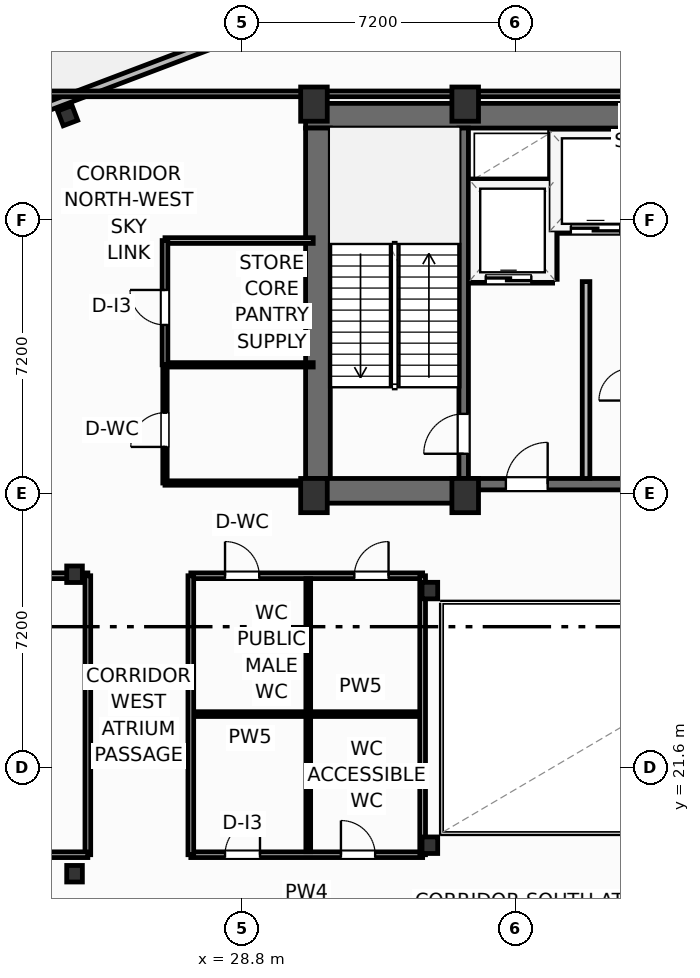
"""IFC4 building model, lengths in metres.
Left out: names, types, materials, properties, quantities, classifications, styles, units other than length and angle.
Written with IfcOpenShell. Run it as: python <this file> out.ifc"""

import sys

from ifc_helpers import new_model, si_unit, direction, frame, frame_2d, origin, origin_2d, place, context, subcontext, project, spatial, rectangle, i_section, extrude, element, fill, save


model = new_model("IFC4")
c1 = context("Model", 3, precision=1e-05, world=origin(), true_north=direction((0.0, 1.0)))
c2 = subcontext(c1, "Body", "Model", "MODEL_VIEW")
j1 = project(units=[si_unit("LENGTHUNIT", "METRE"), si_unit("PLANEANGLEUNIT", "RADIAN")], contexts=[c1])
p1 = place(None, origin())
s1 = spatial("IfcSite", under=j1, at=p1, CompositionType="ELEMENT")
p2 = place(p1, origin())
s2 = spatial("IfcBuilding", under=s1, at=p2, CompositionType="ELEMENT")
p3 = place(p2, frame((0.0, 0.0, 207.9)))
s3 = spatial("IfcBuildingStorey", under=s2, at=p3, CompositionType="ELEMENT", Elevation=207.9)
for number, where, z_axis, x_axis in (
    (1, (30.7, 28.75, 0.0), (0.0, 0.0, 1.0), (1.0, 0.0, 0.0)),
    (2, (34.68, 28.75, 0.0), (0.0, 0.0, 1.0), (1.0, 0.0, 0.0)),
    (3, (30.7, 39.05, 0.0), (0.0, 0.0, 1.0), (1.0, 0.0, 0.0)),
    (4, (34.68, 39.05, 0.0), (0.0, 0.0, 1.0), (1.0, 0.0, 0.0)),
):
    element("IfcColumn", number, at=place(p3, frame(where, z_axis=z_axis, x_axis=x_axis)), inside=s3, PredefinedType="COLUMN", context=c2, shape_type="SweptSolid", body=[
        extrude(rectangle(XDim=0.7, YDim=0.9, at=origin_2d()), origin(), (0.0, 0.0, 1.0), 4.8),
    ])
for number, where, z_axis, x_axis in (
    (5, (33.75, 19.55, 0.0), (0.0, 0.0, 1.0), (1.0, 0.0, 0.0)),
    (6, (33.75, 26.25, 0.0), (0.0, 0.0, 1.0), (1.0, 0.0, 0.0)),
    (7, (24.4, 18.8, 0.0), (0.0, 0.0, 1.0), (1.0, 0.0, 0.0)),
    (8, (24.4, 26.68, 0.0), (0.0, 0.0, 1.0), (1.0, 0.0, 0.0)),
):
    element("IfcColumn", number, at=place(p3, frame(where, z_axis=z_axis, x_axis=x_axis)), inside=s3, PredefinedType="COLUMN", context=c2, shape_type="SweptSolid", body=[
        extrude(i_section(OverallWidth=0.412, OverallDepth=0.435, WebThickness=0.036, FlangeThickness=0.057, FilletRadius=0.025, at=origin_2d()), origin(), (0.0, 0.0, 1.0), 4.8),
    ])
p4 = place(p3, frame((30.48, 38.745, 0.0), z_axis=(0.0, 0.0, 1.0), x_axis=(1.0, 0.0, 0.0)))
e9 = element("IfcWall", 9, at=p4, inside=s3, PredefinedType="SHEAR", context=c2, shape_type="SweptSolid", body=[
    extrude(rectangle(XDim=17.44, YDim=0.65, at=frame_2d((8.72, 0.0))), origin(), (0.0, 0.0, 1.0), 4.55),
])
p5 = place(p3, frame((30.805, 29.2, 0.0), z_axis=(0.0, 0.0, 1.0), x_axis=(0.0, 1.0, 0.0)))
e10 = element("IfcWall", 10, at=p5, inside=s3, PredefinedType="SHEAR", context=c2, shape_type="SweptSolid", body=[
    extrude(rectangle(XDim=9.22, YDim=0.65, at=frame_2d((4.61, 0.0))), origin(), (0.0, 0.0, 1.0), 4.55),
])
p6 = place(p3, frame((30.48, 28.875, 0.0), z_axis=(0.0, 0.0, 1.0), x_axis=(1.0, 0.0, 0.0)))
e11 = element("IfcWall", 11, at=p6, inside=s3, PredefinedType="SHEAR", context=c2, shape_type="SweptSolid", body=[
    extrude(rectangle(XDim=4.32, YDim=0.65, at=frame_2d((2.16, 0.0))), origin(), (0.0, 0.0, 1.0), 4.55),
])
p7 = place(p3, frame((34.8, 29.05, 0.0), z_axis=(0.0, 0.0, 1.0), x_axis=(1.0, 0.0, 0.0)))
e12 = element("IfcWall", 12, at=p7, inside=s3, PredefinedType="SHEAR", context=c2, shape_type="SweptSolid", body=[
    extrude(rectangle(XDim=8.8, YDim=0.3, at=frame_2d((4.4, 0.0))), origin(), (0.0, 0.0, 1.0), 4.55),
])
p8 = place(p7, frame((0.95, 0.0, 0.0)))
e13 = element("IfcOpeningElement", 13, at=p8, cuts=e12, PredefinedType="OPENING", context=c2, shape_type="SweptSolid", body=[
    extrude(rectangle(XDim=1.1, YDim=2.15, at=frame_2d((0.55, 1.075))), frame((0.0, 0.16, 0.0), z_axis=(0.0, -1.0, 0.0), x_axis=(1.0, 0.0, 0.0)), (0.0, 0.0, 1.0), 0.32),
])
p9 = place(p7, frame((6.75, 0.0, 0.0)))
e14 = element("IfcOpeningElement", 14, at=p9, cuts=e12, PredefinedType="OPENING", context=c2, shape_type="SweptSolid", body=[
    extrude(rectangle(XDim=1.1, YDim=2.15, at=frame_2d((0.55, 1.075))), frame((0.0, 0.16, 0.0), z_axis=(0.0, -1.0, 0.0), x_axis=(1.0, 0.0, 0.0)), (0.0, 0.0, 1.0), 0.32),
])
p10 = place(p7, frame((4.45, 0.0, 0.0)))
e15 = element("IfcOpeningElement", 15, at=p10, cuts=e12, PredefinedType="OPENING", context=c2, shape_type="SweptSolid", body=[
    extrude(rectangle(XDim=0.95, YDim=2.15, at=frame_2d((0.475, 1.075))), frame((0.0, 0.16, 0.0), z_axis=(0.0, -1.0, 0.0), x_axis=(1.0, 0.0, 0.0)), (0.0, 0.0, 1.0), 0.32),
])
p11 = place(p3, frame((34.64, 29.2, 0.0), z_axis=(0.0, 0.0, 1.0), x_axis=(0.0, 1.0, 0.0)))
e16 = element("IfcWall", 16, at=p11, inside=s3, PredefinedType="SHEAR", context=c2, shape_type="SweptSolid", body=[
    extrude(rectangle(XDim=9.22, YDim=0.25, at=frame_2d((4.61, 0.0))), origin(), (0.0, 0.0, 1.0), 4.55),
])
p12 = place(p11, frame((0.65, 0.0, 0.0)))
e17 = element("IfcOpeningElement", 17, at=p12, cuts=e16, PredefinedType="OPENING", context=c2, shape_type="SweptSolid", body=[
    extrude(rectangle(XDim=1.05, YDim=2.15, at=frame_2d((0.525, 1.075))), frame((0.0, 0.135, 0.0), z_axis=(0.0, -1.0, 0.0), x_axis=(1.0, 0.0, 0.0)), (0.0, 0.0, 1.0), 0.27),
])
p13 = place(p3, frame((24.219, 38.747, -0.32), z_axis=(0.0, 0.0, 1.0), x_axis=(0.935221751401, 0.354062530786, 0.0)))
e18 = element("IfcColumn", 18, at=p13, inside=s3, PredefinedType="COLUMN", context=c2, shape_type="SweptSolid", body=[
    extrude(i_section(OverallWidth=0.406, OverallDepth=0.416, WebThickness=0.03, FlangeThickness=0.048, FilletRadius=0.025, at=origin_2d()), origin(), (0.0, 0.0, 1.0), 5.12),
])
p14 = place(p3, frame((8.315, 33.164, 0.0), z_axis=(0.0, 0.0, 1.0), x_axis=(0.935222646765, 0.354060165759, 0.0)))
e19 = element("IfcWall", 19, at=p14, inside=s3, PredefinedType="SOLIDWALL", context=c2, shape_type="SweptSolid", body=[
    extrude(rectangle(XDim=52.2, YDim=0.22, at=frame_2d((26.1, 0.0))), origin(), (0.0, 0.0, 1.0), 3.83),
])
p15 = place(p14, frame((23.64, 0.0, 0.0)))
e20 = element("IfcOpeningElement", 20, at=p15, cuts=e19, PredefinedType="OPENING", context=c2, shape_type="SweptSolid", body=[
    extrude(rectangle(XDim=1.85, YDim=2.3, at=frame_2d((0.925, 1.15))), frame((0.0, 0.12, 0.0), z_axis=(0.0, -1.0, 0.0), x_axis=(1.0, 0.0, 0.0)), (0.0, 0.0, 1.0), 0.24),
])
p16 = place(p14, frame((0.55, 0.0, 0.75)))
e21 = element("IfcOpeningElement", 21, at=p16, cuts=e19, PredefinedType="OPENING", context=c2, shape_type="SweptSolid", body=[
    extrude(rectangle(XDim=1.85, YDim=1.75, at=frame_2d((0.925, 0.875))), frame((0.0, 0.12, 0.0), z_axis=(0.0, -1.0, 0.0), x_axis=(1.0, 0.0, 0.0)), (0.0, 0.0, 1.0), 0.24),
])
p17 = place(p14, frame((49.8, 0.0, 0.75)))
e22 = element("IfcOpeningElement", 22, at=p17, cuts=e19, PredefinedType="OPENING", context=c2, shape_type="SweptSolid", body=[
    extrude(rectangle(XDim=1.85, YDim=1.75, at=frame_2d((0.925, 0.875))), frame((0.0, 0.12, 0.0), z_axis=(0.0, -1.0, 0.0), x_axis=(1.0, 0.0, 0.0)), (0.0, 0.0, 1.0), 0.24),
])
p18 = place(p3, frame((27.46, 26.64, 0.0), z_axis=(0.0, 0.0, 1.0), x_axis=(1.0, 0.0, 0.0)))
e23 = element("IfcWall", 23, at=p18, inside=s3, PredefinedType="PARTITIONING", context=c2, shape_type="SweptSolid", body=[
    extrude(rectangle(XDim=6.1, YDim=0.15, at=frame_2d((3.05, 0.0))), origin(), (0.0, 0.0, 1.0), 3.762),
])
p19 = place(p18, frame((0.9, 0.0, 0.0)))
e24 = element("IfcOpeningElement", 24, at=p19, cuts=e23, PredefinedType="OPENING", context=c2, shape_type="SweptSolid", body=[
    extrude(rectangle(XDim=0.9, YDim=2.05, at=frame_2d((0.45, 1.025))), frame((0.0, 0.085, 0.0), z_axis=(0.0, -1.0, 0.0), x_axis=(1.0, 0.0, 0.0)), (0.0, 0.0, 1.0), 0.17),
])
p20 = place(p18, frame((4.303, 0.0, 0.0)))
e25 = element("IfcOpeningElement", 25, at=p20, cuts=e23, PredefinedType="OPENING", context=c2, shape_type="SweptSolid", body=[
    extrude(rectangle(XDim=0.9, YDim=2.05, at=frame_2d((0.45, 1.025))), frame((0.0, 0.085, 0.0), z_axis=(0.0, -1.0, 0.0), x_axis=(1.0, 0.0, 0.0)), (0.0, 0.0, 1.0), 0.17),
])
p21 = place(p3, frame((27.46, 19.3, 0.0), z_axis=(0.0, 0.0, 1.0), x_axis=(1.0, 0.0, 0.0)))
e26 = element("IfcWall", 26, at=p21, inside=s3, PredefinedType="PARTITIONING", context=c2, shape_type="SweptSolid", body=[
    extrude(rectangle(XDim=6.1, YDim=0.15, at=frame_2d((3.05, 0.0))), origin(), (0.0, 0.0, 1.0), 3.762),
])
p22 = place(p21, frame((0.9, 0.0, 0.0)))
e27 = element("IfcOpeningElement", 27, at=p22, cuts=e26, PredefinedType="OPENING", context=c2, shape_type="SweptSolid", body=[
    extrude(rectangle(XDim=0.92, YDim=2.05, at=frame_2d((0.46, 1.025))), frame((0.0, 0.085, 0.0), z_axis=(0.0, -1.0, 0.0), x_axis=(1.0, 0.0, 0.0)), (0.0, 0.0, 1.0), 0.17),
])
p23 = place(p21, frame((3.95, 0.0, 0.0)))
e28 = element("IfcOpeningElement", 28, at=p23, cuts=e26, PredefinedType="OPENING", context=c2, shape_type="SweptSolid", body=[
    extrude(rectangle(XDim=0.9, YDim=2.05, at=frame_2d((0.45, 1.025))), frame((0.0, 0.085, 0.0), z_axis=(0.0, -1.0, 0.0), x_axis=(1.0, 0.0, 0.0)), (0.0, 0.0, 1.0), 0.17),
])
p24 = place(p3, frame((30.55, 19.38, 0.0), z_axis=(0.0, 0.0, 1.0), x_axis=(0.0, 1.0, 0.0)))
e29 = element("IfcWall", 29, at=p24, inside=s3, PredefinedType="PARTITIONING", context=c2, shape_type="SweptSolid", body=[
    extrude(rectangle(XDim=7.18, YDim=0.125, at=frame_2d((3.59, 0.0))), origin(), (0.0, 0.0, 1.0), 4.55),
])
p25 = place(p3, frame((27.52, 23.0, 0.0), z_axis=(0.0, 0.0, 1.0), x_axis=(1.0, 0.0, 0.0)))
e30 = element("IfcWall", 30, at=p25, inside=s3, PredefinedType="PARTITIONING", context=c2, shape_type="SweptSolid", body=[
    extrude(rectangle(XDim=6.0, YDim=0.125, at=frame_2d((3.0, 0.0))), origin(), (0.0, 0.0, 1.0), 4.55),
])
p26 = place(p3, frame((27.46, 19.3, 0.0), z_axis=(0.0, 0.0, 1.0), x_axis=(0.0, 1.0, 0.0)))
e31 = element("IfcWall", 31, at=p26, inside=s3, PredefinedType="PARTITIONING", context=c2, shape_type="SweptSolid", body=[
    extrude(rectangle(XDim=7.34, YDim=0.15, at=frame_2d((3.67, 0.0))), origin(), (0.0, 0.0, 1.0), 4.55),
])
p27 = place(p3, frame((33.56, 19.3, 0.0), z_axis=(0.0, 0.0, 1.0), x_axis=(0.0, 1.0, 0.0)))
e32 = element("IfcWall", 32, at=p27, inside=s3, PredefinedType="PARTITIONING", context=c2, shape_type="SweptSolid", body=[
    extrude(rectangle(XDim=7.34, YDim=0.15, at=frame_2d((3.67, 0.0))), origin(), (0.0, 0.0, 1.0), 3.924),
])
p28 = place(p3, frame((15.9, 26.64, 0.0), z_axis=(0.0, 0.0, 1.0), x_axis=(1.0, 0.0, 0.0)))
e33 = element("IfcWall", 33, at=p28, inside=s3, PredefinedType="PARTITIONING", context=c2, shape_type="SweptSolid", body=[
    extrude(rectangle(XDim=8.85, YDim=0.15, at=frame_2d((4.425, 0.0))), origin(), (0.0, 0.0, 1.0), 3.762),
])
p29 = place(p28, frame((2.2, 0.0, 0.0)))
e34 = element("IfcOpeningElement", 34, at=p29, cuts=e33, PredefinedType="OPENING", context=c2, shape_type="SweptSolid", body=[
    extrude(rectangle(XDim=2.0, YDim=2.05, at=frame_2d((1.0, 1.025))), frame((0.0, 0.085, 0.0), z_axis=(0.0, -1.0, 0.0), x_axis=(1.0, 0.0, 0.0)), (0.0, 0.0, 1.0), 0.17),
])
p30 = place(p3, frame((24.75, 19.3, 0.0), z_axis=(0.0, 0.0, 1.0), x_axis=(0.0, 1.0, 0.0)))
e35 = element("IfcWall", 35, at=p30, inside=s3, PredefinedType="PARTITIONING", context=c2, shape_type="SweptSolid", body=[
    extrude(rectangle(XDim=7.34, YDim=0.15, at=frame_2d((3.67, 0.0))), origin(), (0.0, 0.0, 1.0), 4.55),
])
p31 = place(p3, frame((15.9, 19.3, 0.0), z_axis=(0.0, 0.0, 1.0), x_axis=(1.0, 0.0, 0.0)))
e36 = element("IfcWall", 36, at=p31, inside=s3, PredefinedType="PARTITIONING", context=c2, shape_type="SweptSolid", body=[
    extrude(rectangle(XDim=8.85, YDim=0.15, at=frame_2d((4.425, 0.0))), origin(), (0.0, 0.0, 1.0), 4.55),
])
p32 = place(p3, frame((20.0, 39.32, 0.0), z_axis=(0.0, 0.0, 1.0), x_axis=(1.0, 0.0, 0.0)))
e37 = element("IfcWall", 37, at=p32, inside=s3, PredefinedType="PARTITIONING", context=c2, shape_type="SweptSolid", body=[
    extrude(rectangle(XDim=40.0, YDim=0.15, at=frame_2d((20.0, 0.0))), origin(), (0.0, 0.0, 1.0), 4.55),
])
p33 = place(p32, frame((31.2, 0.0, 0.0)))
e38 = element("IfcOpeningElement", 38, at=p33, cuts=e37, PredefinedType="OPENING", context=c2, shape_type="SweptSolid", body=[
    extrude(rectangle(XDim=1.0, YDim=2.05, at=frame_2d((0.5, 1.025))), frame((0.0, 0.085, 0.0), z_axis=(0.0, -1.0, 0.0), x_axis=(1.0, 0.0, 0.0)), (0.0, 0.0, 1.0), 0.17),
])
p34 = place(p3, frame((37.86, 29.2, 0.0), z_axis=(0.0, 0.0, 1.0), x_axis=(0.0, 1.0, 0.0)))
e39 = element("IfcWall", 39, at=p34, inside=s3, PredefinedType="PARTITIONING", context=c2, shape_type="SweptSolid", body=[
    extrude(rectangle(XDim=5.18, YDim=0.2, at=frame_2d((2.59, 0.0))), origin(), (0.0, 0.0, 1.0), 4.55),
])
p35 = place(p3, frame((34.8, 34.44, 0.0), z_axis=(0.0, 0.0, 1.0), x_axis=(1.0, 0.0, 0.0)))
e40 = element("IfcWall", 40, at=p35, inside=s3, PredefinedType="PARTITIONING", context=c2, shape_type="SweptSolid", body=[
    extrude(rectangle(XDim=2.18, YDim=0.2, at=frame_2d((1.09, 0.0))), origin(), (0.0, 0.0, 1.0), 4.55),
])
p36 = place(p35, frame((0.42, 0.0, 0.0)))
e41 = element("IfcOpeningElement", 41, at=p36, cuts=e40, PredefinedType="OPENING", context=c2, shape_type="SweptSolid", body=[
    extrude(rectangle(XDim=1.2, YDim=2.2, at=frame_2d((0.6, 1.1))), frame((0.0, 0.11, 0.0), z_axis=(0.0, -1.0, 0.0), x_axis=(1.0, 0.0, 0.0)), (0.0, 0.0, 1.0), 0.22),
])
p37 = place(p3, frame((34.8, 36.98, 0.0), z_axis=(0.0, 0.0, 1.0), x_axis=(1.0, 0.0, 0.0)))
e42 = element("IfcWall", 42, at=p37, inside=s3, PredefinedType="PARTITIONING", context=c2, shape_type="SweptSolid", body=[
    extrude(rectangle(XDim=2.18, YDim=0.2, at=frame_2d((1.09, 0.0))), origin(), (0.0, 0.0, 1.0), 4.55),
])
p38 = place(p3, frame((37.0, 34.44, 0.0), z_axis=(0.0, 0.0, 1.0), x_axis=(0.0, 1.0, 0.0)))
e43 = element("IfcWall", 43, at=p38, inside=s3, PredefinedType="PARTITIONING", context=c2, shape_type="SweptSolid", body=[
    extrude(rectangle(XDim=3.9, YDim=0.2, at=frame_2d((1.95, 0.0))), origin(), (0.0, 0.0, 1.0), 4.55),
])
p39 = place(p3, frame((37.06, 35.75, 0.0), z_axis=(0.0, 0.0, 1.0), x_axis=(1.0, 0.0, 0.0)))
e44 = element("IfcWall", 44, at=p39, inside=s3, PredefinedType="PARTITIONING", context=c2, shape_type="SweptSolid", body=[
    extrude(rectangle(XDim=2.12, YDim=0.2, at=frame_2d((1.06, 0.0))), origin(), (0.0, 0.0, 1.0), 4.55),
])
p40 = place(p39, frame((0.4, 0.0, 0.0)))
e45 = element("IfcOpeningElement", 45, at=p40, cuts=e44, PredefinedType="OPENING", context=c2, shape_type="SweptSolid", body=[
    extrude(rectangle(XDim=1.3, YDim=2.2, at=frame_2d((0.65, 1.1))), frame((0.0, 0.11, 0.0), z_axis=(0.0, -1.0, 0.0), x_axis=(1.0, 0.0, 0.0)), (0.0, 0.0, 1.0), 0.22),
])
p41 = place(p3, frame((26.8, 32.19, 0.0), z_axis=(0.0, 0.0, 1.0), x_axis=(1.0, 0.0, 0.0)))
e46 = element("IfcWall", 46, at=p41, inside=s3, PredefinedType="PARTITIONING", context=c2, shape_type="SweptSolid", body=[
    extrude(rectangle(XDim=3.88, YDim=0.115, at=frame_2d((1.94, 0.0))), origin(), (0.0, 0.0, 1.0), 4.55),
])
p42 = place(p3, frame((26.78, 29.08, 0.0), z_axis=(0.0, 0.0, 1.0), x_axis=(1.0, 0.0, 0.0)))
e47 = element("IfcWall", 47, at=p42, inside=s3, PredefinedType="PARTITIONING", context=c2, shape_type="SweptSolid", body=[
    extrude(rectangle(XDim=3.7, YDim=0.115, at=frame_2d((1.85, 0.0))), origin(), (0.0, 0.0, 1.0), 4.55),
])
p43 = place(p3, frame((26.78, 35.46, 0.0), z_axis=(0.0, 0.0, 1.0), x_axis=(1.0, 0.0, 0.0)))
e48 = element("IfcWall", 48, at=p43, inside=s3, PredefinedType="PARTITIONING", context=c2, shape_type="SweptSolid", body=[
    extrude(rectangle(XDim=3.9, YDim=0.15, at=frame_2d((1.95, 0.0))), origin(), (0.0, 0.0, 1.0), 4.55),
])
p44 = place(p3, frame((26.78, 29.08, 0.0), z_axis=(0.0, 0.0, 1.0), x_axis=(0.0, 1.0, 0.0)))
e49 = element("IfcWall", 49, at=p44, inside=s3, PredefinedType="PARTITIONING", context=c2, shape_type="SweptSolid", body=[
    extrude(rectangle(XDim=3.11, YDim=0.115, at=frame_2d((1.555, 0.0))), origin(), (0.0, 0.0, 1.0), 4.55),
])
p45 = place(p44, frame((0.95, 0.0, 0.0)))
e50 = element("IfcOpeningElement", 50, at=p45, cuts=e49, PredefinedType="OPENING", context=c2, shape_type="SweptSolid", body=[
    extrude(rectangle(XDim=0.9, YDim=2.05, at=frame_2d((0.45, 1.025))), frame((0.0, 0.067, 0.0), z_axis=(0.0, -1.0, 0.0), x_axis=(1.0, 0.0, 0.0)), (0.0, 0.0, 1.0), 0.135),
])
p46 = place(p3, frame((26.78, 32.19, 0.0), z_axis=(0.0, 0.0, 1.0), x_axis=(0.0, 1.0, 0.0)))
e51 = element("IfcWall", 51, at=p46, inside=s3, PredefinedType="PARTITIONING", context=c2, shape_type="SweptSolid", body=[
    extrude(rectangle(XDim=3.27, YDim=0.15, at=frame_2d((1.635, 0.0))), origin(), (0.0, 0.0, 1.0), 4.55),
])
p47 = place(p46, frame((1.05, 0.0, 0.0)))
e52 = element("IfcOpeningElement", 52, at=p47, cuts=e51, PredefinedType="OPENING", context=c2, shape_type="SweptSolid", body=[
    extrude(rectangle(XDim=0.92, YDim=2.05, at=frame_2d((0.46, 1.025))), frame((0.0, 0.085, 0.0), z_axis=(0.0, -1.0, 0.0), x_axis=(1.0, 0.0, 0.0)), (0.0, 0.0, 1.0), 0.17),
])
p48 = place(p19, origin())
e53 = element("IfcDoor", 53, at=p48, inside=s3, OperationType="SINGLE_SWING_LEFT", PredefinedType="DOOR", context=c2, shape_type="SweptSolid", body=[
    extrude(rectangle(XDim=0.9, YDim=2.05, at=frame_2d((0.45, 1.025))), frame((0.0, 0.025, 0.0), z_axis=(0.0, -1.0, 0.0), x_axis=(1.0, 0.0, 0.0)), (0.0, 0.0, 1.0), 0.05),
])
fill(e24, e53)
p49 = place(p20, origin())
e54 = element("IfcDoor", 54, at=p49, inside=s3, OperationType="SINGLE_SWING_RIGHT", PredefinedType="DOOR", context=c2, shape_type="SweptSolid", body=[
    extrude(rectangle(XDim=0.9, YDim=2.05, at=frame_2d((0.45, 1.025))), frame((0.0, 0.025, 0.0), z_axis=(0.0, -1.0, 0.0), x_axis=(1.0, 0.0, 0.0)), (0.0, 0.0, 1.0), 0.05),
])
fill(e25, e54)
p50 = place(p22, origin())
e55 = element("IfcDoor", 55, at=p50, inside=s3, OperationType="SINGLE_SWING_RIGHT", PredefinedType="DOOR", context=c2, shape_type="SweptSolid", body=[
    extrude(rectangle(XDim=0.92, YDim=2.05, at=frame_2d((0.46, 1.025))), frame((0.0, 0.025, 0.0), z_axis=(0.0, -1.0, 0.0), x_axis=(1.0, 0.0, 0.0)), (0.0, 0.0, 1.0), 0.05),
])
fill(e27, e55)
p51 = place(p23, origin())
e56 = element("IfcDoor", 56, at=p51, inside=s3, OperationType="SINGLE_SWING_LEFT", PredefinedType="DOOR", context=c2, shape_type="SweptSolid", body=[
    extrude(rectangle(XDim=0.9, YDim=2.05, at=frame_2d((0.45, 1.025))), frame((0.0, 0.025, 0.0), z_axis=(0.0, -1.0, 0.0), x_axis=(1.0, 0.0, 0.0)), (0.0, 0.0, 1.0), 0.05),
])
fill(e28, e56)
p52 = place(p12, origin())
e57 = element("IfcDoor", 57, at=p52, inside=s3, OperationType="SINGLE_SWING_LEFT", PredefinedType="DOOR", context=c2, shape_type="SweptSolid", body=[
    extrude(rectangle(XDim=1.05, YDim=2.15, at=frame_2d((0.525, 1.075))), frame((0.0, 0.025, 0.0), z_axis=(0.0, -1.0, 0.0), x_axis=(1.0, 0.0, 0.0)), (0.0, 0.0, 1.0), 0.05),
])
fill(e17, e57)
p53 = place(p8, origin())
e58 = element("IfcDoor", 58, at=p53, inside=s3, OperationType="SINGLE_SWING_RIGHT", PredefinedType="DOOR", context=c2, shape_type="SweptSolid", body=[
    extrude(rectangle(XDim=1.1, YDim=2.15, at=frame_2d((0.55, 1.075))), frame((0.0, 0.025, 0.0), z_axis=(0.0, -1.0, 0.0), x_axis=(1.0, 0.0, 0.0)), (0.0, 0.0, 1.0), 0.05),
])
fill(e13, e58)
p54 = place(p36, origin())
e59 = element("IfcDoor", 59, at=p54, inside=s3, OperationType="SLIDING_TO_LEFT", PredefinedType="DOOR", context=c2, shape_type="SweptSolid", body=[
    extrude(rectangle(XDim=1.2, YDim=2.2, at=frame_2d((0.6, 1.1))), frame((0.0, 0.025, 0.0), z_axis=(0.0, -1.0, 0.0), x_axis=(1.0, 0.0, 0.0)), (0.0, 0.0, 1.0), 0.05),
])
fill(e41, e59)
p55 = place(p40, origin())
e60 = element("IfcDoor", 60, at=p55, inside=s3, OperationType="SLIDING_TO_LEFT", PredefinedType="DOOR", context=c2, shape_type="SweptSolid", body=[
    extrude(rectangle(XDim=1.3, YDim=2.2, at=frame_2d((0.65, 1.1))), frame((0.0, 0.025, 0.0), z_axis=(0.0, -1.0, 0.0), x_axis=(1.0, 0.0, 0.0)), (0.0, 0.0, 1.0), 0.05),
])
fill(e45, e60)
p56 = place(p45, origin())
e61 = element("IfcDoor", 61, at=p56, inside=s3, OperationType="SINGLE_SWING_LEFT", PredefinedType="DOOR", context=c2, shape_type="SweptSolid", body=[
    extrude(rectangle(XDim=0.9, YDim=2.05, at=frame_2d((0.45, 1.025))), frame((0.0, 0.025, 0.0), z_axis=(0.0, -1.0, 0.0), x_axis=(1.0, 0.0, 0.0)), (0.0, 0.0, 1.0), 0.05),
])
fill(e50, e61)
p57 = place(p47, origin())
e62 = element("IfcDoor", 62, at=p57, inside=s3, OperationType="SINGLE_SWING_RIGHT", PredefinedType="DOOR", context=c2, shape_type="SweptSolid", body=[
    extrude(rectangle(XDim=0.92, YDim=2.05, at=frame_2d((0.46, 1.025))), frame((0.0, 0.025, 0.0), z_axis=(0.0, -1.0, 0.0), x_axis=(1.0, 0.0, 0.0)), (0.0, 0.0, 1.0), 0.05),
])
fill(e52, e62)
save(model, sys.argv[1])
